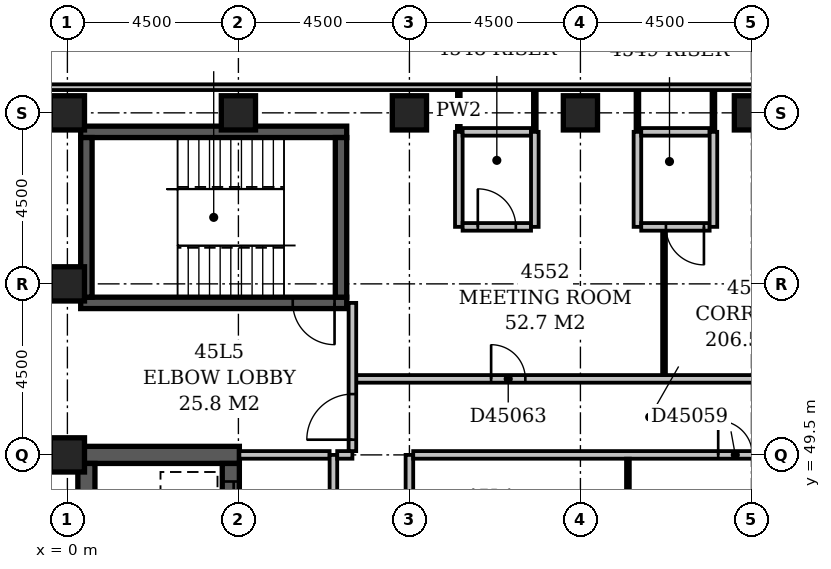
"""IFC4 building model, lengths in metres.
Left out: names, types, materials, properties, quantities, classifications, styles, units other than length and angle.
Written with IfcOpenShell. Run it as: python <this file> out.ifc"""

import sys

from ifc_helpers import new_model, si_unit, direction, frame, frame_2d, origin, origin_2d, place, context, subcontext, project, spatial, rectangle, extrude, element, fill, save


model = new_model("IFC4")
c1 = context("Model", 3, precision=1e-05, world=origin(), true_north=direction((0.0, 1.0)))
c2 = subcontext(c1, "Body", "Model", "MODEL_VIEW")
j1 = project(units=[si_unit("LENGTHUNIT", "METRE"), si_unit("PLANEANGLEUNIT", "RADIAN")], contexts=[c1])
p1 = place(None, origin())
s1 = spatial("IfcSite", under=j1, at=p1, CompositionType="ELEMENT")
p2 = place(p1, origin())
s2 = spatial("IfcBuilding", under=s1, at=p2, CompositionType="ELEMENT")
p3 = place(p2, frame((0.0, 0.0, 179.0)))
s3 = spatial("IfcBuildingStorey", under=s2, at=p3, CompositionType="ELEMENT", Elevation=179.0)
p4 = place(p3, frame((0.275, 49.5, -0.3), z_axis=(0.0, 0.0, 1.0), x_axis=(1.0, 0.0, 0.0)))
e1 = element("IfcWall", 1, at=p4, inside=s3, PredefinedType="SHEAR", context=c2, shape_type="SweptSolid", body=[
    extrude(rectangle(XDim=4.25, YDim=0.45, at=frame_2d((2.125, 0.0))), origin(), (0.0, 0.0, 1.0), 3.6),
])
p5 = place(p3, frame((0.35, 53.5, -0.3), z_axis=(0.0, 0.0, 1.0), x_axis=(1.0, 0.0, 0.0)))
e2 = element("IfcWall", 2, at=p5, inside=s3, PredefinedType="SHEAR", context=c2, shape_type="SweptSolid", body=[
    extrude(rectangle(XDim=7.0, YDim=0.3, at=frame_2d((3.5, 0.0))), origin(), (0.0, 0.0, 1.0), 3.6),
])
p6 = place(p5, frame((5.58, 0.0, 0.3)))
e3 = element("IfcOpeningElement", 3, at=p6, cuts=e2, PredefinedType="OPENING", context=c2, shape_type="SweptSolid", body=[
    extrude(rectangle(XDim=1.1, YDim=2.1, at=frame_2d((0.55, 1.05))), frame((0.0, 0.162, 0.0), z_axis=(0.0, -1.0, 0.0), x_axis=(1.0, 0.0, 0.0)), (0.0, 0.0, 1.0), 0.324),
])
p7 = place(p3, frame((0.35, 58.0, -0.3), z_axis=(0.0, 0.0, 1.0), x_axis=(1.0, 0.0, 0.0)))
e4 = element("IfcWall", 4, at=p7, inside=s3, PredefinedType="SHEAR", context=c2, shape_type="SweptSolid", body=[
    extrude(rectangle(XDim=7.0, YDim=0.3, at=frame_2d((3.5, 0.0))), origin(), (0.0, 0.0, 1.0), 3.6),
])
p8 = place(p3, frame((0.5, 27.15, -0.3), z_axis=(0.0, 0.0, 1.0), x_axis=(0.0, 1.0, 0.0)))
e5 = element("IfcWall", 5, at=p8, inside=s3, PredefinedType="SHEAR", context=c2, shape_type="SweptSolid", body=[
    extrude(rectangle(XDim=22.125, YDim=0.45, at=frame_2d((11.062, 0.0))), origin(), (0.0, 0.0, 1.0), 3.6),
])
p9 = place(p3, frame((0.5, 53.65, -0.3), z_axis=(0.0, 0.0, 1.0), x_axis=(0.0, 1.0, 0.0)))
e6 = element("IfcWall", 6, at=p9, inside=s3, PredefinedType="SHEAR", context=c2, shape_type="SweptSolid", body=[
    extrude(rectangle(XDim=4.2, YDim=0.3, at=frame_2d((2.1, 0.0))), origin(), (0.0, 0.0, 1.0), 3.6),
])
p10 = place(p3, frame((4.3, 27.15, -0.3), z_axis=(0.0, 0.0, 1.0), x_axis=(0.0, 1.0, 0.0)))
e7 = element("IfcWall", 7, at=p10, inside=s3, PredefinedType="SHEAR", context=c2, shape_type="SweptSolid", body=[
    extrude(rectangle(XDim=22.125, YDim=0.45, at=frame_2d((11.062, 0.0))), origin(), (0.0, 0.0, 1.0), 3.6),
])
p11 = place(p10, frame((3.05, 0.0, 0.3)))
e8 = element("IfcOpeningElement", 8, at=p11, cuts=e7, PredefinedType="OPENING", context=c2, shape_type="SweptSolid", body=[
    extrude(rectangle(XDim=1.1, YDim=2.1, at=frame_2d((0.55, 1.05))), frame((0.0, 0.237, 0.0), z_axis=(0.0, -1.0, 0.0), x_axis=(1.0, 0.0, 0.0)), (0.0, 0.0, 1.0), 0.474),
])
p12 = place(p10, frame((0.55, 0.0, 0.3)))
e9 = element("IfcOpeningElement", 9, at=p12, cuts=e7, PredefinedType="OPENING", context=c2, shape_type="SweptSolid", body=[
    extrude(rectangle(XDim=1.1, YDim=2.1, at=frame_2d((0.55, 1.05))), frame((0.0, 0.237, 0.0), z_axis=(0.0, -1.0, 0.0), x_axis=(1.0, 0.0, 0.0)), (0.0, 0.0, 1.0), 0.474),
])
p13 = place(p10, frame((20.55, 0.0, 0.3)))
e10 = element("IfcOpeningElement", 10, at=p13, cuts=e7, PredefinedType="OPENING", context=c2, shape_type="SweptSolid", body=[
    extrude(rectangle(XDim=1.1, YDim=2.1, at=frame_2d((0.55, 1.05))), frame((0.0, 0.237, 0.0), z_axis=(0.0, -1.0, 0.0), x_axis=(1.0, 0.0, 0.0)), (0.0, 0.0, 1.0), 0.474),
])
p14 = place(p10, frame((18.05, 0.0, 0.3)))
e11 = element("IfcOpeningElement", 11, at=p14, cuts=e7, PredefinedType="OPENING", context=c2, shape_type="SweptSolid", body=[
    extrude(rectangle(XDim=1.1, YDim=2.1, at=frame_2d((0.55, 1.05))), frame((0.0, 0.237, 0.0), z_axis=(0.0, -1.0, 0.0), x_axis=(1.0, 0.0, 0.0)), (0.0, 0.0, 1.0), 0.474),
])
p15 = place(p10, frame((15.55, 0.0, 0.3)))
e12 = element("IfcOpeningElement", 12, at=p15, cuts=e7, PredefinedType="OPENING", context=c2, shape_type="SweptSolid", body=[
    extrude(rectangle(XDim=1.1, YDim=2.1, at=frame_2d((0.55, 1.05))), frame((0.0, 0.237, 0.0), z_axis=(0.0, -1.0, 0.0), x_axis=(1.0, 0.0, 0.0)), (0.0, 0.0, 1.0), 0.474),
])
p16 = place(p10, frame((13.05, 0.0, 0.3)))
e13 = element("IfcOpeningElement", 13, at=p16, cuts=e7, PredefinedType="OPENING", context=c2, shape_type="SweptSolid", body=[
    extrude(rectangle(XDim=1.1, YDim=2.1, at=frame_2d((0.55, 1.05))), frame((0.0, 0.237, 0.0), z_axis=(0.0, -1.0, 0.0), x_axis=(1.0, 0.0, 0.0)), (0.0, 0.0, 1.0), 0.474),
])
p17 = place(p10, frame((10.55, 0.0, 0.3)))
e14 = element("IfcOpeningElement", 14, at=p17, cuts=e7, PredefinedType="OPENING", context=c2, shape_type="SweptSolid", body=[
    extrude(rectangle(XDim=1.1, YDim=2.1, at=frame_2d((0.55, 1.05))), frame((0.0, 0.237, 0.0), z_axis=(0.0, -1.0, 0.0), x_axis=(1.0, 0.0, 0.0)), (0.0, 0.0, 1.0), 0.474),
])
p18 = place(p10, frame((8.05, 0.0, 0.3)))
e15 = element("IfcOpeningElement", 15, at=p18, cuts=e7, PredefinedType="OPENING", context=c2, shape_type="SweptSolid", body=[
    extrude(rectangle(XDim=1.1, YDim=2.1, at=frame_2d((0.55, 1.05))), frame((0.0, 0.237, 0.0), z_axis=(0.0, -1.0, 0.0), x_axis=(1.0, 0.0, 0.0)), (0.0, 0.0, 1.0), 0.474),
])
p19 = place(p10, frame((5.55, 0.0, 0.3)))
e16 = element("IfcOpeningElement", 16, at=p19, cuts=e7, PredefinedType="OPENING", context=c2, shape_type="SweptSolid", body=[
    extrude(rectangle(XDim=1.1, YDim=2.1, at=frame_2d((0.55, 1.05))), frame((0.0, 0.237, 0.0), z_axis=(0.0, -1.0, 0.0), x_axis=(1.0, 0.0, 0.0)), (0.0, 0.0, 1.0), 0.474),
])
p20 = place(p3, frame((7.2, 53.65, -0.3), z_axis=(0.0, 0.0, 1.0), x_axis=(0.0, 1.0, 0.0)))
e17 = element("IfcWall", 17, at=p20, inside=s3, PredefinedType="SHEAR", context=c2, shape_type="SweptSolid", body=[
    extrude(rectangle(XDim=4.2, YDim=0.3, at=frame_2d((2.1, 0.0))), origin(), (0.0, 0.0, 1.0), 3.6),
])
for number, where, z_axis, x_axis in (
    (18, (0.0, 49.5, -0.3), (0.0, 0.0, 1.0), (1.0, 0.0, 0.0)),
    (19, (0.0, 54.0, -0.3), (0.0, 0.0, 1.0), (1.0, 0.0, 0.0)),
    (20, (0.0, 58.5, -0.3), (0.0, 0.0, 1.0), (1.0, 0.0, 0.0)),
    (21, (4.5, 58.5, -0.3), (0.0, 0.0, 1.0), (1.0, 0.0, 0.0)),
    (22, (9.0, 58.5, -0.3), (0.0, 0.0, 1.0), (1.0, 0.0, 0.0)),
    (23, (13.5, 58.5, -0.3), (0.0, 0.0, 1.0), (1.0, 0.0, 0.0)),
    (24, (18.0, 58.5, -0.3), (0.0, 0.0, 1.0), (1.0, 0.0, 0.0)),
):
    element("IfcColumn", number, at=place(p3, frame(where, z_axis=z_axis, x_axis=x_axis)), inside=s3, PredefinedType="COLUMN", context=c2, shape_type="SweptSolid", body=[
        extrude(rectangle(XDim=0.9, YDim=0.9, at=origin_2d()), origin(), (0.0, 0.0, 1.0), 3.6),
    ])
p21 = place(p3, frame((68.1, 59.175, 0.0), z_axis=(0.0, 0.0, 1.0), x_axis=(-1.0, 0.0, 0.0)))
e25 = element("IfcWall", 25, at=p21, inside=s3, PredefinedType="STANDARD", context=c2, shape_type="SweptSolid", body=[
    extrude(rectangle(XDim=68.85, YDim=0.15, at=frame_2d((34.425, 0.0))), origin(), (0.0, 0.0, 1.0), 2.7),
])
p22 = place(p3, frame((7.0, 34.6, 0.0), z_axis=(0.0, 0.0, 1.0), x_axis=(0.0, 1.0, 0.0)))
e26 = element("IfcWall", 26, at=p22, inside=s3, PredefinedType="PARTITIONING", context=c2, shape_type="SweptSolid", body=[
    extrude(rectangle(XDim=14.9, YDim=0.2, at=frame_2d((7.45, 0.0))), origin(), (0.0, 0.0, 1.0), 3.3),
])
p23 = place(p22, frame((2.8, 0.0, 0.0)))
e27 = element("IfcOpeningElement", 27, at=p23, cuts=e26, PredefinedType="OPENING", context=c2, shape_type="SweptSolid", body=[
    extrude(rectangle(XDim=1.2, YDim=2.1, at=frame_2d((0.6, 1.05))), frame((0.0, 0.112, 0.0), z_axis=(0.0, -1.0, 0.0), x_axis=(1.0, 0.0, 0.0)), (0.0, 0.0, 1.0), 0.224),
])
p24 = place(p22, frame((9.8, 0.0, 0.0)))
e28 = element("IfcOpeningElement", 28, at=p24, cuts=e26, PredefinedType="OPENING", context=c2, shape_type="SweptSolid", body=[
    extrude(rectangle(XDim=1.2, YDim=2.1, at=frame_2d((0.6, 1.05))), frame((0.0, 0.112, 0.0), z_axis=(0.0, -1.0, 0.0), x_axis=(1.0, 0.0, 0.0)), (0.0, 0.0, 1.0), 0.224),
])
p25 = place(p3, frame((4.525, 49.5, 0.0), z_axis=(0.0, 0.0, 1.0), x_axis=(1.0, 0.0, 0.0)))
e29 = element("IfcWall", 29, at=p25, inside=s3, PredefinedType="PARTITIONING", context=c2, shape_type="SweptSolid", body=[
    extrude(rectangle(XDim=2.375, YDim=0.2, at=frame_2d((1.188, 0.0))), origin(), (0.0, 0.0, 1.0), 3.3),
])
p26 = place(p3, frame((7.1, 49.5, 0.0), z_axis=(0.0, 0.0, 1.0), x_axis=(1.0, 0.0, 0.0)))
e30 = element("IfcWall", 30, at=p26, inside=s3, PredefinedType="PARTITIONING", context=c2, shape_type="SweptSolid", body=[
    extrude(rectangle(XDim=0.4, YDim=0.2, at=frame_2d((0.2, 0.0))), origin(), (0.0, 0.0, 1.0), 3.3),
])
p27 = place(p3, frame((7.5, 49.6, 0.0), z_axis=(0.0, 0.0, 1.0), x_axis=(0.0, 1.0, 0.0)))
e31 = element("IfcWall", 31, at=p27, inside=s3, PredefinedType="PARTITIONING", context=c2, shape_type="SweptSolid", body=[
    extrude(rectangle(XDim=3.9, YDim=0.2, at=frame_2d((1.95, 0.0))), origin(), (0.0, 0.0, 1.0), 3.3),
])
p28 = place(p27, frame((0.3, 0.0, 0.0)))
e32 = element("IfcOpeningElement", 32, at=p28, cuts=e31, PredefinedType="OPENING", context=c2, shape_type="SweptSolid", body=[
    extrude(rectangle(XDim=1.2, YDim=2.1, at=frame_2d((0.6, 1.05))), frame((0.0, 0.112, 0.0), z_axis=(0.0, -1.0, 0.0), x_axis=(1.0, 0.0, 0.0)), (0.0, 0.0, 1.0), 0.224),
])
p29 = place(p3, frame((9.0, 38.0, 0.0), z_axis=(0.0, 0.0, 1.0), x_axis=(0.0, 1.0, 0.0)))
e33 = element("IfcWall", 33, at=p29, inside=s3, PredefinedType="PARTITIONING", context=c2, shape_type="SweptSolid", body=[
    extrude(rectangle(XDim=11.5, YDim=0.2, at=frame_2d((5.75, 0.0))), origin(), (0.0, 0.0, 1.0), 3.3),
])
p30 = place(p29, frame((5.25, 0.0, 0.0)))
e34 = element("IfcOpeningElement", 34, at=p30, cuts=e33, PredefinedType="OPENING", context=c2, shape_type="SweptSolid", body=[
    extrude(rectangle(XDim=0.9, YDim=2.1, at=frame_2d((0.45, 1.05))), frame((0.0, 0.112, 0.0), z_axis=(0.0, -1.0, 0.0), x_axis=(1.0, 0.0, 0.0)), (0.0, 0.0, 1.0), 0.224),
])
p31 = place(p3, frame((14.75, 38.1, 0.0), z_axis=(0.0, 0.0, 1.0), x_axis=(0.0, 1.0, 0.0)))
e35 = element("IfcWall", 35, at=p31, inside=s3, PredefinedType="PARTITIONING", context=c2, shape_type="SweptSolid", body=[
    extrude(rectangle(XDim=11.3, YDim=0.1, at=frame_2d((5.65, 0.0))), origin(), (0.0, 0.0, 1.0), 3.3),
])
p32 = place(p3, frame((9.1, 49.5, 0.0), z_axis=(0.0, 0.0, 1.0), x_axis=(1.0, 0.0, 0.0)))
e36 = element("IfcWall", 36, at=p32, inside=s3, PredefinedType="PARTITIONING", context=c2, shape_type="SweptSolid", body=[
    extrude(rectangle(XDim=11.3, YDim=0.2, at=frame_2d((5.65, 0.0))), origin(), (0.0, 0.0, 1.0), 3.3),
])
p33 = place(p32, frame((8.025, 0.0, 0.0)))
e37 = element("IfcOpeningElement", 37, at=p33, cuts=e36, PredefinedType="OPENING", context=c2, shape_type="SweptSolid", body=[
    extrude(rectangle(XDim=0.9, YDim=2.1, at=frame_2d((0.45, 1.05))), frame((0.0, 0.112, 0.0), z_axis=(0.0, -1.0, 0.0), x_axis=(1.0, 0.0, 0.0)), (0.0, 0.0, 1.0), 0.224),
])
p34 = place(p3, frame((7.6, 51.5, 0.0), z_axis=(0.0, 0.0, 1.0), x_axis=(1.0, 0.0, 0.0)))
e38 = element("IfcWall", 38, at=p34, inside=s3, PredefinedType="PARTITIONING", context=c2, shape_type="SweptSolid", body=[
    extrude(rectangle(XDim=15.3, YDim=0.2, at=frame_2d((7.65, 0.0))), origin(), (0.0, 0.0, 1.0), 3.3),
])
p35 = place(p34, frame((3.55, 0.0, 0.0)))
e39 = element("IfcOpeningElement", 39, at=p35, cuts=e38, PredefinedType="OPENING", context=c2, shape_type="SweptSolid", body=[
    extrude(rectangle(XDim=0.9, YDim=2.1, at=frame_2d((0.45, 1.05))), frame((0.0, 0.112, 0.0), z_axis=(0.0, -1.0, 0.0), x_axis=(1.0, 0.0, 0.0)), (0.0, 0.0, 1.0), 0.224),
])
p36 = place(p34, frame((11.3, 0.0, 0.0)))
e40 = element("IfcOpeningElement", 40, at=p36, cuts=e38, PredefinedType="OPENING", context=c2, shape_type="SweptSolid", body=[
    extrude(rectangle(XDim=0.9, YDim=2.1, at=frame_2d((0.45, 1.05))), frame((0.0, 0.112, 0.0), z_axis=(0.0, -1.0, 0.0), x_axis=(1.0, 0.0, 0.0)), (0.0, 0.0, 1.0), 0.224),
])
p37 = place(p3, frame((15.7, 51.6, 0.0), z_axis=(0.0, 0.0, 1.0), x_axis=(0.0, 1.0, 0.0)))
e41 = element("IfcWall", 41, at=p37, inside=s3, PredefinedType="PARTITIONING", context=c2, shape_type="SweptSolid", body=[
    extrude(rectangle(XDim=3.8, YDim=0.1, at=frame_2d((1.9, 0.0))), origin(), (0.0, 0.0, 1.0), 3.3),
])
p38 = place(p3, frame((10.3, 55.5, 0.0), z_axis=(0.0, 0.0, 1.0), x_axis=(0.0, 1.0, 0.0)))
e42 = element("IfcWall", 42, at=p38, inside=s3, PredefinedType="PARTITIONING", context=c2, shape_type="SweptSolid", body=[
    extrude(rectangle(XDim=2.5, YDim=0.2, at=frame_2d((1.25, 0.0))), origin(), (0.0, 0.0, 1.0), 3.3),
])
p39 = place(p3, frame((10.4, 55.5, 0.0), z_axis=(0.0, 0.0, 1.0), x_axis=(1.0, 0.0, 0.0)))
e43 = element("IfcWall", 43, at=p39, inside=s3, PredefinedType="PARTITIONING", context=c2, shape_type="SweptSolid", body=[
    extrude(rectangle(XDim=1.8, YDim=0.2, at=frame_2d((0.9, 0.0))), origin(), (0.0, 0.0, 1.0), 3.3),
])
p40 = place(p39, frame((0.4, 0.0, 0.0)))
e44 = element("IfcOpeningElement", 44, at=p40, cuts=e43, PredefinedType="OPENING", context=c2, shape_type="SweptSolid", body=[
    extrude(rectangle(XDim=1.0, YDim=2.1, at=frame_2d((0.5, 1.05))), frame((0.0, 0.112, 0.0), z_axis=(0.0, -1.0, 0.0), x_axis=(1.0, 0.0, 0.0)), (0.0, 0.0, 1.0), 0.224),
])
for number, where, z_axis, x_axis in (
    (45, (12.3, 55.5, 0.0), (0.0, 0.0, 1.0), (0.0, 1.0, 0.0)),
    (46, (15.0, 55.5, 0.0), (0.0, 0.0, 1.0), (0.0, 1.0, 0.0)),
):
    element("IfcWall", number, at=place(p3, frame(where, z_axis=z_axis, x_axis=x_axis)), inside=s3, PredefinedType="PARTITIONING", context=c2, shape_type="SweptSolid", body=[
        extrude(rectangle(XDim=2.5, YDim=0.2, at=frame_2d((1.25, 0.0))), origin(), (0.0, 0.0, 1.0), 3.3),
    ])
p41 = place(p3, frame((15.1, 55.5, 0.0), z_axis=(0.0, 0.0, 1.0), x_axis=(1.0, 0.0, 0.0)))
e47 = element("IfcWall", 47, at=p41, inside=s3, PredefinedType="PARTITIONING", context=c2, shape_type="SweptSolid", body=[
    extrude(rectangle(XDim=1.8, YDim=0.2, at=frame_2d((0.9, 0.0))), origin(), (0.0, 0.0, 1.0), 3.3),
])
p42 = place(p41, frame((0.65, 0.0, 0.0)))
e48 = element("IfcOpeningElement", 48, at=p42, cuts=e47, PredefinedType="OPENING", context=c2, shape_type="SweptSolid", body=[
    extrude(rectangle(XDim=1.0, YDim=2.1, at=frame_2d((0.5, 1.05))), frame((0.0, 0.112, 0.0), z_axis=(0.0, -1.0, 0.0), x_axis=(1.0, 0.0, 0.0)), (0.0, 0.0, 1.0), 0.224),
])
p43 = place(p3, frame((17.0, 55.5, 0.0), z_axis=(0.0, 0.0, 1.0), x_axis=(0.0, 1.0, 0.0)))
e49 = element("IfcWall", 49, at=p43, inside=s3, PredefinedType="PARTITIONING", context=c2, shape_type="SweptSolid", body=[
    extrude(rectangle(XDim=2.5, YDim=0.2, at=frame_2d((1.25, 0.0))), origin(), (0.0, 0.0, 1.0), 3.3),
])
p44 = place(p3, frame((10.3, 58.0, 0.0), z_axis=(0.0, 0.0, 1.0), x_axis=(0.0, 1.0, 0.0)))
e50 = element("IfcWall", 50, at=p44, inside=s3, PredefinedType="PARTITIONING", context=c2, shape_type="SweptSolid", body=[
    extrude(rectangle(XDim=1.1, YDim=0.1, at=frame_2d((0.55, 0.0))), origin(), (0.0, 0.0, 1.0), 3.3),
])
p45 = place(p3, frame((10.4, 58.0, 0.0), z_axis=(0.0, 0.0, 1.0), x_axis=(1.0, 0.0, 0.0)))
e51 = element("IfcWall", 51, at=p45, inside=s3, PredefinedType="PARTITIONING", context=c2, shape_type="SweptSolid", body=[
    extrude(rectangle(XDim=1.8, YDim=0.2, at=frame_2d((0.9, 0.0))), origin(), (0.0, 0.0, 1.0), 3.3),
])
for number, where, z_axis, x_axis in (
    (52, (12.3, 58.0, 0.0), (0.0, 0.0, 1.0), (0.0, 1.0, 0.0)),
    (53, (15.0, 58.0, 0.0), (0.0, 0.0, 1.0), (0.0, 1.0, 0.0)),
):
    element("IfcWall", number, at=place(p3, frame(where, z_axis=z_axis, x_axis=x_axis)), inside=s3, PredefinedType="PARTITIONING", context=c2, shape_type="SweptSolid", body=[
        extrude(rectangle(XDim=1.1, YDim=0.1, at=frame_2d((0.55, 0.0))), origin(), (0.0, 0.0, 1.0), 3.3),
    ])
p46 = place(p3, frame((15.1, 58.0, 0.0), z_axis=(0.0, 0.0, 1.0), x_axis=(1.0, 0.0, 0.0)))
e54 = element("IfcWall", 54, at=p46, inside=s3, PredefinedType="PARTITIONING", context=c2, shape_type="SweptSolid", body=[
    extrude(rectangle(XDim=1.8, YDim=0.2, at=frame_2d((0.9, 0.0))), origin(), (0.0, 0.0, 1.0), 3.3),
])
p47 = place(p3, frame((17.0, 58.0, 0.0), z_axis=(0.0, 0.0, 1.0), x_axis=(0.0, 1.0, 0.0)))
e55 = element("IfcWall", 55, at=p47, inside=s3, PredefinedType="PARTITIONING", context=c2, shape_type="SweptSolid", body=[
    extrude(rectangle(XDim=1.1, YDim=0.1, at=frame_2d((0.55, 0.0))), origin(), (0.0, 0.0, 1.0), 3.3),
])
p48 = place(p28, origin())
e56 = element("IfcDoor", 56, at=p48, inside=s3, OperationType="SINGLE_SWING_LEFT", PredefinedType="DOOR", context=c2, shape_type="SweptSolid", body=[
    extrude(rectangle(XDim=1.2, YDim=2.1, at=frame_2d((0.6, 1.05))), frame((0.0, 0.025, 0.0), z_axis=(0.0, -1.0, 0.0), x_axis=(1.0, 0.0, 0.0)), (0.0, 0.0, 1.0), 0.05),
])
fill(e32, e56)
p49 = place(p13, origin())
e57 = element("IfcDoor", 57, at=p49, inside=s3, OperationType="SLIDING_TO_LEFT", PredefinedType="DOOR", context=c2, shape_type="SweptSolid", body=[
    extrude(rectangle(XDim=1.1, YDim=2.1, at=frame_2d((0.55, 1.05))), frame((0.0, 0.025, 0.0), z_axis=(0.0, -1.0, 0.0), x_axis=(1.0, 0.0, 0.0)), (0.0, 0.0, 1.0), 0.05),
])
fill(e10, e57)
p50 = place(p6, origin())
e58 = element("IfcDoor", 58, at=p50, inside=s3, OperationType="SINGLE_SWING_RIGHT", PredefinedType="DOOR", context=c2, shape_type="SweptSolid", body=[
    extrude(rectangle(XDim=1.1, YDim=2.1, at=frame_2d((0.55, 1.05))), frame((0.0, 0.025, 0.0), z_axis=(0.0, -1.0, 0.0), x_axis=(1.0, 0.0, 0.0)), (0.0, 0.0, 1.0), 0.05),
])
fill(e3, e58)
p51 = place(p33, origin())
e59 = element("IfcDoor", 59, at=p51, inside=s3, OperationType="SINGLE_SWING_LEFT", PredefinedType="DOOR", context=c2, shape_type="SweptSolid", body=[
    extrude(rectangle(XDim=0.9, YDim=2.1, at=frame_2d((0.45, 1.05))), frame((0.0, 0.025, 0.0), z_axis=(0.0, -1.0, 0.0), x_axis=(1.0, 0.0, 0.0)), (0.0, 0.0, 1.0), 0.05),
])
fill(e37, e59)
p52 = place(p35, origin())
e60 = element("IfcDoor", 60, at=p52, inside=s3, OperationType="SINGLE_SWING_LEFT", PredefinedType="DOOR", context=c2, shape_type="SweptSolid", body=[
    extrude(rectangle(XDim=0.9, YDim=2.1, at=frame_2d((0.45, 1.05))), frame((0.0, 0.025, 0.0), z_axis=(0.0, -1.0, 0.0), x_axis=(1.0, 0.0, 0.0)), (0.0, 0.0, 1.0), 0.05),
])
fill(e39, e60)
p53 = place(p40, origin())
e61 = element("IfcDoor", 61, at=p53, inside=s3, OperationType="SINGLE_SWING_LEFT", PredefinedType="DOOR", context=c2, shape_type="SweptSolid", body=[
    extrude(rectangle(XDim=1.0, YDim=2.1, at=frame_2d((0.5, 1.05))), frame((0.0, 0.025, 0.0), z_axis=(0.0, -1.0, 0.0), x_axis=(1.0, 0.0, 0.0)), (0.0, 0.0, 1.0), 0.05),
])
fill(e44, e61)
p54 = place(p42, origin())
e62 = element("IfcDoor", 62, at=p54, inside=s3, OperationType="SINGLE_SWING_RIGHT", PredefinedType="DOOR", context=c2, shape_type="SweptSolid", body=[
    extrude(rectangle(XDim=1.0, YDim=2.1, at=frame_2d((0.5, 1.05))), frame((0.0, 0.025, 0.0), z_axis=(0.0, -1.0, 0.0), x_axis=(1.0, 0.0, 0.0)), (0.0, 0.0, 1.0), 0.05),
])
fill(e48, e62)
save(model, sys.argv[1])
